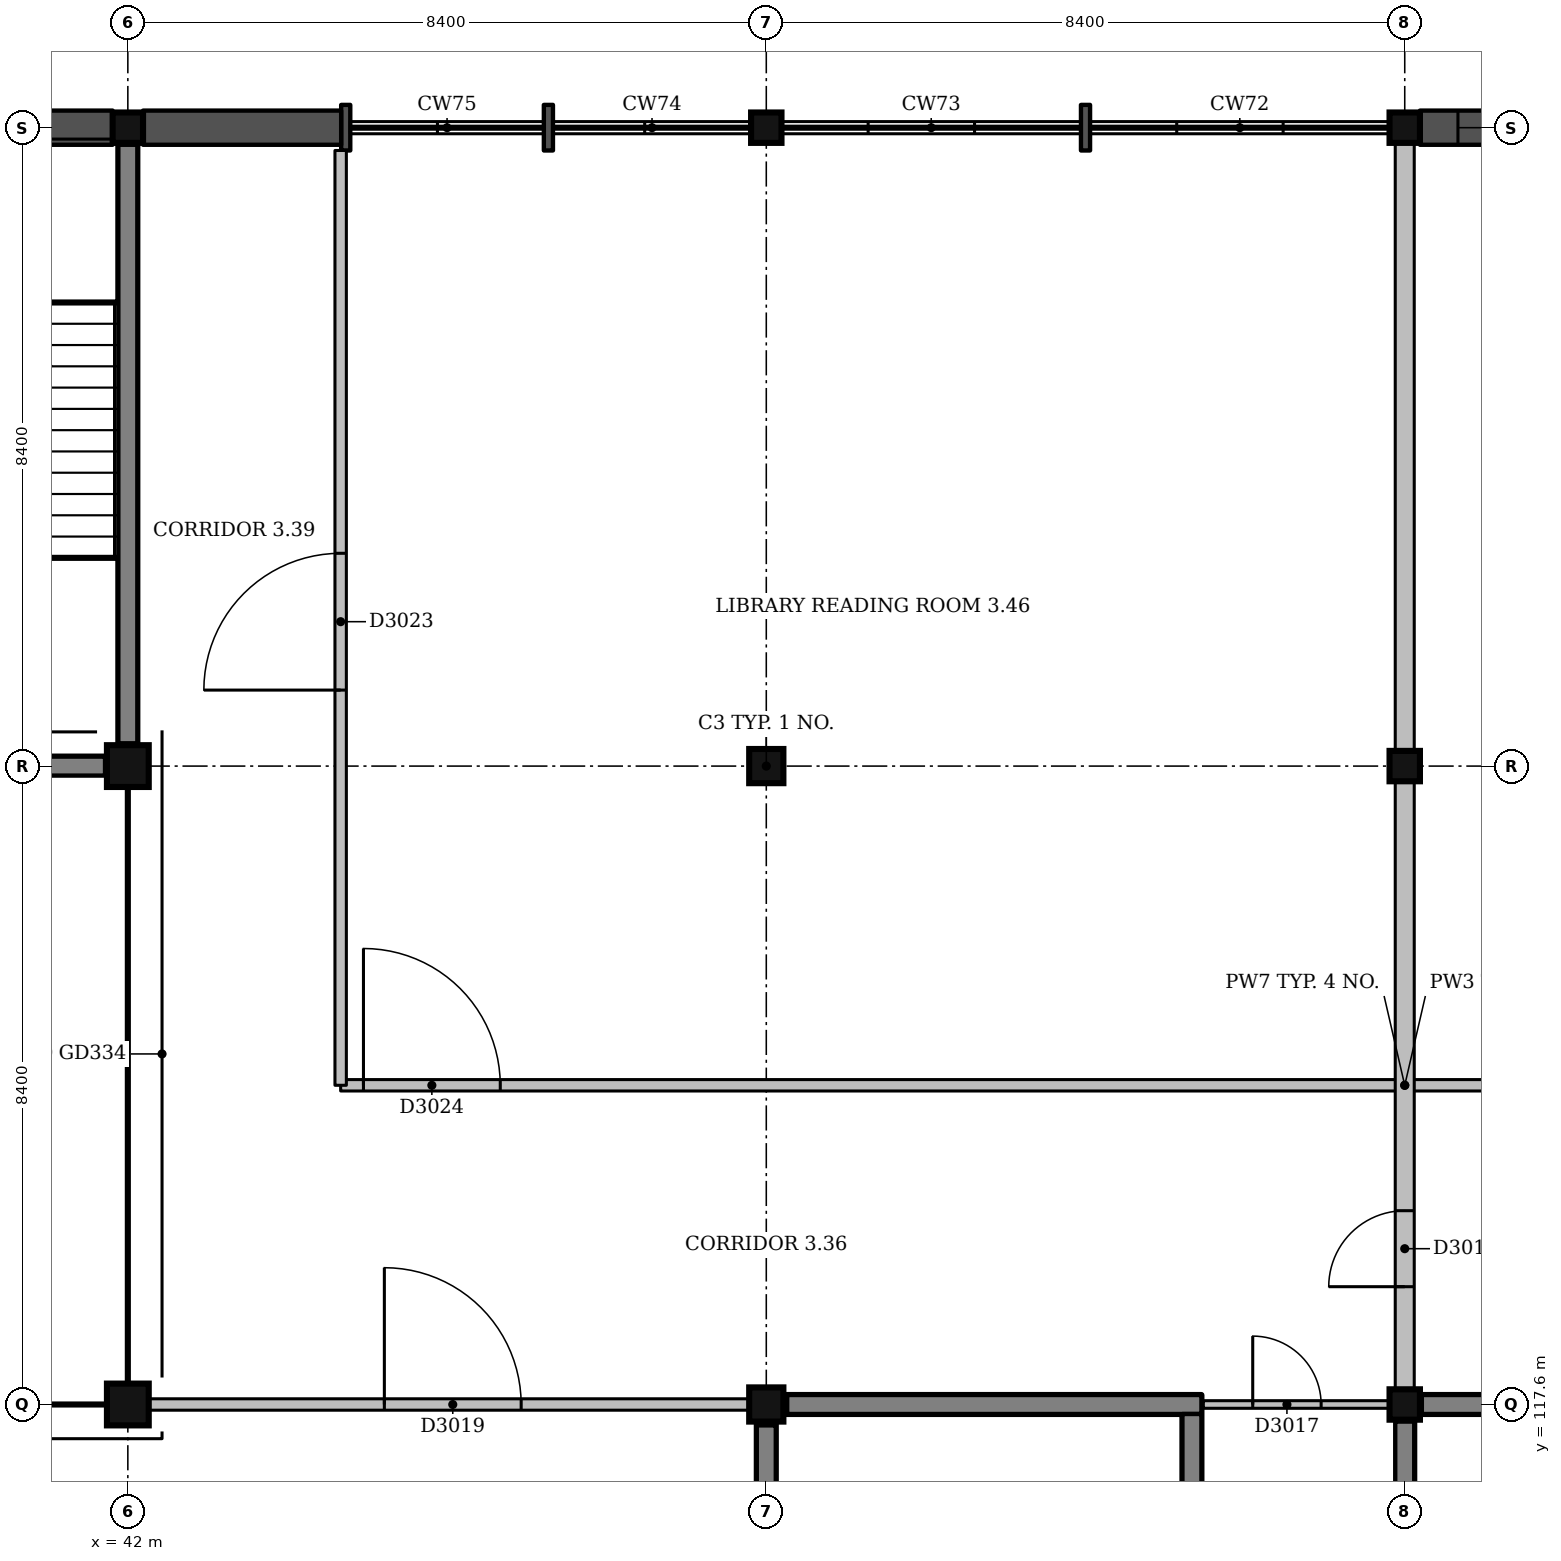
"""IFC4 building model, lengths in metres.
Left out: names, types, materials, properties, quantities, classifications, styles, units other than length and angle.
Written with IfcOpenShell. Run it as: python <this file> out.ifc"""

import sys

from ifc_helpers import new_model, si_unit, direction, frame, frame_2d, origin, origin_2d, place, context, subcontext, project, spatial, rectangle, extrude, element, fill, save


model = new_model("IFC4")
c1 = context("Model", 3, precision=1e-05, world=origin(), true_north=direction((0.0, 1.0)))
c2 = subcontext(c1, "Body", "Model", "MODEL_VIEW")
j1 = project(units=[si_unit("LENGTHUNIT", "METRE"), si_unit("PLANEANGLEUNIT", "RADIAN")], contexts=[c1])
p1 = place(None, origin())
s1 = spatial("IfcSite", under=j1, at=p1, CompositionType="ELEMENT")
p2 = place(p1, origin())
s2 = spatial("IfcBuilding", under=s1, at=p2, CompositionType="ELEMENT")
p3 = place(p2, frame((0.0, 0.0, 13.5)))
s3 = spatial("IfcBuildingStorey", under=s2, at=p3, CompositionType="ELEMENT", Elevation=13.5)
for number, where, z_axis, x_axis in (
    (1, (42.0, 117.6, 0.0), (0.0, 0.0, 1.0), (1.0, 0.0, 0.0)),
    (2, (42.0, 126.0, 0.0), (0.0, 0.0, 1.0), (1.0, 0.0, 0.0)),
):
    element("IfcColumn", number, at=place(p3, frame(where, z_axis=z_axis, x_axis=x_axis)), inside=s3, PredefinedType="COLUMN", context=c2, shape_type="SweptSolid", body=[
        extrude(rectangle(XDim=0.55, YDim=0.55, at=origin_2d()), origin(), (0.0, 0.0, 1.0), 4.5),
    ])
p4 = place(p3, frame((42.0, 134.4, 0.0), z_axis=(0.0, 0.0, 1.0), x_axis=(1.0, 0.0, 0.0)))
e3 = element("IfcColumn", 3, at=p4, inside=s3, PredefinedType="COLUMN", context=c2, shape_type="SweptSolid", body=[
    extrude(rectangle(XDim=0.4, YDim=0.4, at=origin_2d()), origin(), (0.0, 0.0, 1.0), 4.5),
])
for number, where, z_axis, x_axis in (
    (4, (50.4, 117.6, 0.0), (0.0, 0.0, 1.0), (1.0, 0.0, 0.0)),
    (5, (50.4, 126.0, 0.0), (0.0, 0.0, 1.0), (1.0, 0.0, 0.0)),
):
    element("IfcColumn", number, at=place(p3, frame(where, z_axis=z_axis, x_axis=x_axis)), inside=s3, PredefinedType="COLUMN", context=c2, shape_type="SweptSolid", body=[
        extrude(rectangle(XDim=0.45, YDim=0.45, at=origin_2d()), origin(), (0.0, 0.0, 1.0), 4.5),
    ])
for number, where, z_axis, x_axis in (
    (6, (50.4, 134.4, 0.0), (0.0, 0.0, 1.0), (1.0, 0.0, 0.0)),
    (7, (58.8, 117.6, 0.0), (0.0, 0.0, 1.0), (1.0, 0.0, 0.0)),
    (8, (58.8, 126.0, 0.0), (0.0, 0.0, 1.0), (1.0, 0.0, 0.0)),
    (9, (58.8, 134.4, 0.0), (0.0, 0.0, 1.0), (1.0, 0.0, 0.0)),
):
    element("IfcColumn", number, at=place(p3, frame(where, z_axis=z_axis, x_axis=x_axis)), inside=s3, PredefinedType="COLUMN", context=c2, shape_type="SweptSolid", body=[
        extrude(rectangle(XDim=0.4, YDim=0.4, at=origin_2d()), origin(), (0.0, 0.0, 1.0), 4.5),
    ])
p5 = place(p3, frame((59.025, 117.6, 0.0), z_axis=(0.0, 0.0, 1.0), x_axis=(1.0, 0.0, 0.0)))
e10 = element("IfcWall", 10, at=p5, inside=s3, PredefinedType="SHEAR", context=c2, shape_type="SweptSolid", body=[
    extrude(rectangle(XDim=5.5, YDim=0.25, at=frame_2d((2.75, 0.0))), origin(), (0.0, 0.0, 1.0), 4.5),
])
p6 = place(p3, frame((58.8, 109.4, 0.0), z_axis=(0.0, 0.0, 1.0), x_axis=(0.0, 1.0, 0.0)))
e11 = element("IfcWall", 11, at=p6, inside=s3, PredefinedType="SHEAR", context=c2, shape_type="SweptSolid", body=[
    extrude(rectangle(XDim=7.975, YDim=0.25, at=frame_2d((3.988, 0.0))), origin(), (0.0, 0.0, 1.0), 4.5),
])
p7 = place(p6, frame((0.55, 0.0, 0.0)))
e12 = element("IfcOpeningElement", 12, at=p7, cuts=e11, PredefinedType="OPENING", context=c2, shape_type="SweptSolid", body=[
    extrude(rectangle(XDim=1.0, YDim=2.1, at=frame_2d((0.5, 1.05))), frame((0.0, 0.135, 0.0), z_axis=(0.0, -1.0, 0.0), x_axis=(1.0, 0.0, 0.0)), (0.0, 0.0, 1.0), 0.27),
])
p8 = place(p3, frame((36.275, 126.0, 0.0), z_axis=(0.0, 0.0, 1.0), x_axis=(1.0, 0.0, 0.0)))
e13 = element("IfcWall", 13, at=p8, inside=s3, PredefinedType="SHEAR", context=c2, shape_type="SweptSolid", body=[
    extrude(rectangle(XDim=5.425, YDim=0.25, at=frame_2d((2.712, 0.0))), origin(), (0.0, 0.0, 1.0), 4.5),
])
p9 = place(p3, frame((42.0, 126.3, 0.0), z_axis=(0.0, 0.0, 1.0), x_axis=(0.0, 1.0, 0.0)))
e14 = element("IfcWall", 14, at=p9, inside=s3, PredefinedType="SHEAR", context=c2, shape_type="SweptSolid", body=[
    extrude(rectangle(XDim=7.875, YDim=0.25, at=frame_2d((3.938, 0.0))), origin(), (0.0, 0.0, 1.0), 4.5),
])
p10 = place(p3, frame((50.675, 117.6, 0.0), z_axis=(0.0, 0.0, 1.0), x_axis=(1.0, 0.0, 0.0)))
e15 = element("IfcWall", 15, at=p10, inside=s3, PredefinedType="SHEAR", context=c2, shape_type="SweptSolid", body=[
    extrude(rectangle(XDim=5.45, YDim=0.25, at=frame_2d((2.725, 0.0))), origin(), (0.0, 0.0, 1.0), 4.5),
])
p11 = place(p3, frame((50.4, 109.4, 0.0), z_axis=(0.0, 0.0, 1.0), x_axis=(0.0, 1.0, 0.0)))
e16 = element("IfcWall", 16, at=p11, inside=s3, PredefinedType="SHEAR", context=c2, shape_type="SweptSolid", body=[
    extrude(rectangle(XDim=7.925, YDim=0.25, at=frame_2d((3.962, 0.0))), origin(), (0.0, 0.0, 1.0), 4.5),
])
p12 = place(p11, frame((0.55, 0.0, 0.0)))
e17 = element("IfcOpeningElement", 17, at=p12, cuts=e16, PredefinedType="OPENING", context=c2, shape_type="SweptSolid", body=[
    extrude(rectangle(XDim=1.0, YDim=2.1, at=frame_2d((0.5, 1.05))), frame((0.0, 0.135, 0.0), z_axis=(0.0, -1.0, 0.0), x_axis=(1.0, 0.0, 0.0)), (0.0, 0.0, 1.0), 0.27),
])
p13 = place(p3, frame((56.0, 109.325, 0.0), z_axis=(0.0, 0.0, 1.0), x_axis=(0.0, 1.0, 0.0)))
e18 = element("IfcWall", 18, at=p13, inside=s3, PredefinedType="SHEAR", context=c2, shape_type="SweptSolid", body=[
    extrude(rectangle(XDim=8.15, YDim=0.25, at=frame_2d((4.075, 0.0))), origin(), (0.0, 0.0, 1.0), 4.5),
])
for number, where, z_axis, x_axis in (
    (19, (54.66, 134.4, 0.0), (0.0, 0.0, 1.0), (-1.0, 0.0, 0.0)),
    (20, (47.593, 134.4, 0.0), (0.0, 0.0, 1.0), (-1.0, 0.0, 0.0)),
):
    element("IfcWall", number, at=place(p3, frame(where, z_axis=z_axis, x_axis=x_axis)), inside=s3, PredefinedType="SOLIDWALL", context=c2, shape_type="SweptSolid", body=[
        extrude(rectangle(XDim=0.12, YDim=0.6, at=frame_2d((0.06, 0.0))), origin(), (0.0, 0.0, 1.0), 3.35),
    ])
p14 = place(p3, frame((44.927, 134.4, 0.0), z_axis=(0.0, 0.0, 1.0), x_axis=(-1.0, 0.0, 0.0)))
e21 = element("IfcWall", 21, at=p14, inside=s3, PredefinedType="SOLIDWALL", context=c2, shape_type="SweptSolid", body=[
    extrude(rectangle(XDim=0.12, YDim=0.6, at=frame_2d((0.06, 0.0))), origin(), (0.0, 0.0, 1.0), 3.35),
])
for number, where, z_axis, x_axis in (
    (22, (44.807, 134.4, 0.0), (0.0, 0.0, 1.0), (-1.0, 0.0, 0.0)),
    (23, (41.8, 134.4, 0.0), (0.0, 0.0, 1.0), (-1.0, 0.0, 0.0)),
):
    element("IfcWall", number, at=place(p3, frame(where, z_axis=z_axis, x_axis=x_axis)), inside=s3, PredefinedType="SOLIDWALL", context=c2, shape_type="SweptSolid", body=[
        extrude(rectangle(XDim=2.607, YDim=0.45, at=frame_2d((1.303, 0.0))), origin(), (0.0, 0.0, 1.0), 3.35),
    ])
p15 = place(p3, frame((62.7, 134.4, 0.0), z_axis=(0.0, 0.0, 1.0), x_axis=(-1.0, 0.0, 0.0)))
e24 = element("IfcWall", 24, at=p15, inside=s3, PredefinedType="SOLIDWALL", context=c2, shape_type="SweptSolid", body=[
    extrude(rectangle(XDim=3.7, YDim=0.45, at=frame_2d((1.85, 0.0))), origin(), (0.0, 0.0, 1.0), 3.45),
])
p16 = place(p15, frame((0.5, 0.0, 0.6)))
e25 = element("IfcOpeningElement", 25, at=p16, cuts=e24, PredefinedType="OPENING", context=c2, shape_type="SweptSolid", body=[
    extrude(rectangle(XDim=2.7, YDim=2.4, at=frame_2d((1.35, 1.2))), frame((0.0, 0.235, 0.0), z_axis=(0.0, -1.0, 0.0), x_axis=(1.0, 0.0, 0.0)), (0.0, 0.0, 1.0), 0.47),
])
p17 = place(p3, frame((42.275, 117.6, 0.0), z_axis=(0.0, 0.0, 1.0), x_axis=(1.0, 0.0, 0.0)))
e26 = element("IfcWall", 26, at=p17, inside=s3, PredefinedType="PARTITIONING", context=c2, shape_type="SweptSolid", body=[
    extrude(rectangle(XDim=7.9, YDim=0.15, at=frame_2d((3.95, 0.0))), origin(), (0.0, 0.0, 1.0), 3.4),
])
p18 = place(p17, frame((3.1, 0.0, 0.0)))
e27 = element("IfcOpeningElement", 27, at=p18, cuts=e26, PredefinedType="OPENING", context=c2, shape_type="SweptSolid", body=[
    extrude(rectangle(XDim=1.8, YDim=2.1, at=frame_2d((0.9, 1.05))), frame((0.0, 0.085, 0.0), z_axis=(0.0, -1.0, 0.0), x_axis=(1.0, 0.0, 0.0)), (0.0, 0.0, 1.0), 0.17),
])
p19 = place(p3, frame((56.15, 117.6, 0.0), z_axis=(0.0, 0.0, 1.0), x_axis=(1.0, 0.0, 0.0)))
e28 = element("IfcWall", 28, at=p19, inside=s3, PredefinedType="PARTITIONING", context=c2, shape_type="SweptSolid", body=[
    extrude(rectangle(XDim=2.45, YDim=0.1, at=frame_2d((1.225, 0.0))), origin(), (0.0, 0.0, 1.0), 3.35),
])
p20 = place(p19, frame((0.65, 0.0, 0.0)))
e29 = element("IfcOpeningElement", 29, at=p20, cuts=e28, PredefinedType="OPENING", context=c2, shape_type="SweptSolid", body=[
    extrude(rectangle(XDim=0.9, YDim=2.1, at=frame_2d((0.45, 1.05))), frame((0.0, 0.06, 0.0), z_axis=(0.0, -1.0, 0.0), x_axis=(1.0, 0.0, 0.0)), (0.0, 0.0, 1.0), 0.12),
])
p21 = place(p3, frame((44.8, 121.8, 0.0), z_axis=(0.0, 0.0, 1.0), x_axis=(1.0, 0.0, 0.0)))
e30 = element("IfcWall", 30, at=p21, inside=s3, PredefinedType="PARTITIONING", context=c2, shape_type="SweptSolid", body=[
    extrude(rectangle(XDim=28.0, YDim=0.15, at=frame_2d((14.0, 0.0))), origin(), (0.0, 0.0, 1.0), 3.35),
])
p22 = place(p21, frame((0.3, 0.0, 0.0)))
e31 = element("IfcOpeningElement", 31, at=p22, cuts=e30, PredefinedType="OPENING", context=c2, shape_type="SweptSolid", body=[
    extrude(rectangle(XDim=1.8, YDim=2.1, at=frame_2d((0.9, 1.05))), frame((0.0, 0.085, 0.0), z_axis=(0.0, -1.0, 0.0), x_axis=(1.0, 0.0, 0.0)), (0.0, 0.0, 1.0), 0.17),
])
p23 = place(p21, frame((20.25, 0.0, 0.0)))
e32 = element("IfcOpeningElement", 32, at=p23, cuts=e30, PredefinedType="OPENING", context=c2, shape_type="SweptSolid", body=[
    extrude(rectangle(XDim=1.8, YDim=2.1, at=frame_2d((0.9, 1.05))), frame((0.0, 0.085, 0.0), z_axis=(0.0, -1.0, 0.0), x_axis=(1.0, 0.0, 0.0)), (0.0, 0.0, 1.0), 0.17),
])
p24 = place(p3, frame((44.8, 121.8, 0.0), z_axis=(0.0, 0.0, 1.0), x_axis=(0.0, 1.0, 0.0)))
e33 = element("IfcWall", 33, at=p24, inside=s3, PredefinedType="PARTITIONING", context=c2, shape_type="SweptSolid", body=[
    extrude(rectangle(XDim=12.3, YDim=0.15, at=frame_2d((6.15, 0.0))), origin(), (0.0, 0.0, 1.0), 3.4),
])
p25 = place(p24, frame((5.2, 0.0, 0.0)))
e34 = element("IfcOpeningElement", 34, at=p25, cuts=e33, PredefinedType="OPENING", context=c2, shape_type="SweptSolid", body=[
    extrude(rectangle(XDim=1.8, YDim=2.1, at=frame_2d((0.9, 1.05))), frame((0.0, 0.085, 0.0), z_axis=(0.0, -1.0, 0.0), x_axis=(1.0, 0.0, 0.0)), (0.0, 0.0, 1.0), 0.17),
])
p26 = place(p3, frame((58.8, 117.8, 0.0), z_axis=(0.0, 0.0, 1.0), x_axis=(0.0, 1.0, 0.0)))
e35 = element("IfcWall", 35, at=p26, inside=s3, PredefinedType="SOLIDWALL", context=c2, shape_type="SweptSolid", body=[
    extrude(rectangle(XDim=8.0, YDim=0.25, at=frame_2d((4.0, 0.0))), origin(), (0.0, 0.0, 1.0), 3.35),
])
p27 = place(p26, frame((1.35, 0.0, 0.0)))
e36 = element("IfcOpeningElement", 36, at=p27, cuts=e35, PredefinedType="OPENING", context=c2, shape_type="SweptSolid", body=[
    extrude(rectangle(XDim=1.0, YDim=2.1, at=frame_2d((0.5, 1.05))), frame((0.0, 0.135, 0.0), z_axis=(0.0, -1.0, 0.0), x_axis=(1.0, 0.0, 0.0)), (0.0, 0.0, 1.0), 0.27),
])
p28 = place(p3, frame((58.8, 126.2, 0.0), z_axis=(0.0, 0.0, 1.0), x_axis=(0.0, 1.0, 0.0)))
e37 = element("IfcWall", 37, at=p28, inside=s3, PredefinedType="SOLIDWALL", context=c2, shape_type="SweptSolid", body=[
    extrude(rectangle(XDim=8.0, YDim=0.25, at=frame_2d((4.0, 0.0))), origin(), (0.0, 0.0, 1.0), 3.35),
])
p29 = place(p16, origin())
e38 = element("IfcWindow", 38, at=p29, inside=s3, PartitioningType="SINGLE_PANEL", PredefinedType="WINDOW", context=c2, shape_type="SweptSolid", body=[
    extrude(rectangle(XDim=2.7, YDim=2.4, at=frame_2d((1.35, 1.2))), frame((0.0, 0.135, 0.0), z_axis=(0.0, -1.0, 0.0), x_axis=(1.0, 0.0, 0.0)), (0.0, 0.0, 1.0), 0.06),
])
fill(e25, e38)
p30 = place(p27, origin())
e39 = element("IfcDoor", 39, at=p30, inside=s3, OperationType="SINGLE_SWING_LEFT", PredefinedType="DOOR", context=c2, shape_type="SweptSolid", body=[
    extrude(rectangle(XDim=1.0, YDim=2.1, at=frame_2d((0.5, 1.05))), frame((0.0, 0.025, 0.0), z_axis=(0.0, -1.0, 0.0), x_axis=(1.0, 0.0, 0.0)), (0.0, 0.0, 1.0), 0.05),
])
fill(e36, e39)
p31 = place(p20, origin())
e40 = element("IfcDoor", 40, at=p31, inside=s3, OperationType="SINGLE_SWING_LEFT", PredefinedType="DOOR", context=c2, shape_type="SweptSolid", body=[
    extrude(rectangle(XDim=0.9, YDim=2.1, at=frame_2d((0.45, 1.05))), frame((0.0, 0.025, 0.0), z_axis=(0.0, -1.0, 0.0), x_axis=(1.0, 0.0, 0.0)), (0.0, 0.0, 1.0), 0.05),
])
fill(e29, e40)
p32 = place(p18, origin())
e41 = element("IfcDoor", 41, at=p32, inside=s3, OperationType="DOUBLE_DOOR_SINGLE_SWING", PredefinedType="DOOR", context=c2, shape_type="SweptSolid", body=[
    extrude(rectangle(XDim=1.8, YDim=2.1, at=frame_2d((0.9, 1.05))), frame((0.0, 0.025, 0.0), z_axis=(0.0, -1.0, 0.0), x_axis=(1.0, 0.0, 0.0)), (0.0, 0.0, 1.0), 0.05),
])
fill(e27, e41)
p33 = place(p25, origin())
e42 = element("IfcDoor", 42, at=p33, inside=s3, OperationType="DOUBLE_DOOR_SINGLE_SWING", PredefinedType="DOOR", context=c2, shape_type="SweptSolid", body=[
    extrude(rectangle(XDim=1.8, YDim=2.1, at=frame_2d((0.9, 1.05))), frame((0.0, 0.025, 0.0), z_axis=(0.0, -1.0, 0.0), x_axis=(1.0, 0.0, 0.0)), (0.0, 0.0, 1.0), 0.05),
])
fill(e34, e42)
p34 = place(p22, origin())
e43 = element("IfcDoor", 43, at=p34, inside=s3, OperationType="DOUBLE_DOOR_SINGLE_SWING", PredefinedType="DOOR", context=c2, shape_type="SweptSolid", body=[
    extrude(rectangle(XDim=1.8, YDim=2.1, at=frame_2d((0.9, 1.05))), frame((0.0, 0.025, 0.0), z_axis=(0.0, -1.0, 0.0), x_axis=(1.0, 0.0, 0.0)), (0.0, 0.0, 1.0), 0.05),
])
fill(e31, e43)
save(model, sys.argv[1])
